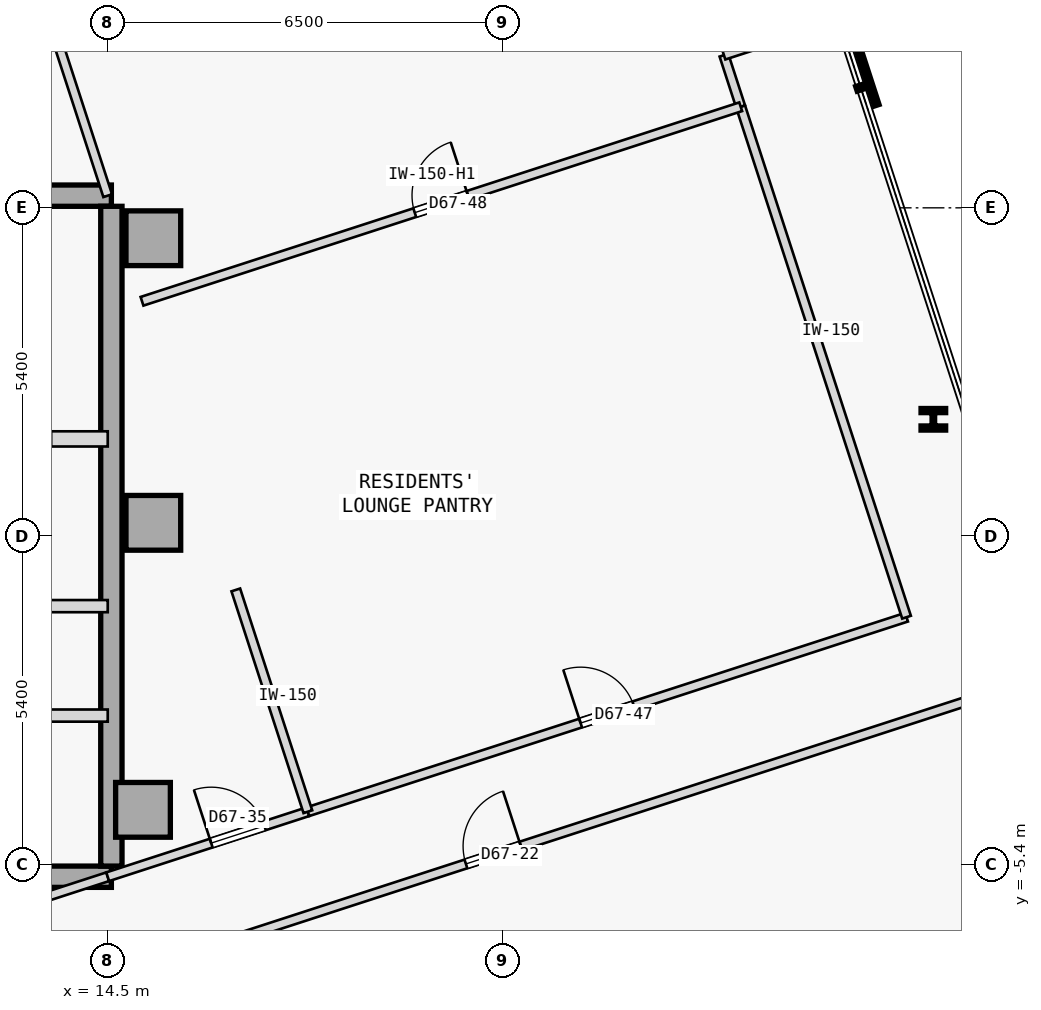
"""IFC4 building model, lengths in metres.
Left out: names, types, materials, properties, quantities, classifications, styles, units other than length and angle.
Written with IfcOpenShell. Run it as: python <this file> out.ifc"""

import sys

from ifc_helpers import new_model, si_unit, direction, frame, frame_2d, origin, origin_2d, place, context, subcontext, project, spatial, rectangle, i_section, extrude, element, fill, save


model = new_model("IFC4")
c1 = context("Model", 3, precision=1e-05, world=origin(), true_north=direction((0.0, 1.0)))
c2 = subcontext(c1, "Body", "Model", "MODEL_VIEW")
j1 = project(units=[si_unit("LENGTHUNIT", "METRE"), si_unit("PLANEANGLEUNIT", "RADIAN")], contexts=[c1])
p1 = place(None, origin())
s1 = spatial("IfcSite", under=j1, at=p1, CompositionType="ELEMENT")
p2 = place(p1, origin())
s2 = spatial("IfcBuilding", under=s1, at=p2, CompositionType="ELEMENT")
p3 = place(p2, frame((0.0, 0.0, 251.1)))
s3 = spatial("IfcBuildingStorey", under=s2, at=p3, CompositionType="ELEMENT", Elevation=251.1)
for number, where, z_axis, x_axis in (
    (1, (15.25, 4.9, 0.0), (0.0, 0.0, 1.0), (1.0, 0.0, 0.0)),
    (2, (15.25, 0.22, 0.0), (0.0, 0.0, 1.0), (1.0, 0.0, 0.0)),
    (3, (15.08, -4.5, 0.0), (0.0, 0.0, 1.0), (1.0, 0.0, 0.0)),
):
    element("IfcColumn", number, at=place(p3, frame(where, z_axis=z_axis, x_axis=x_axis)), inside=s3, PredefinedType="COLUMN", context=c2, shape_type="SweptSolid", body=[
        extrude(rectangle(XDim=0.9, YDim=0.9, at=origin_2d()), origin(), (0.0, 0.0, 1.0), 3.35),
    ])
p4 = place(p3, frame((3.15, 5.6, 0.0), z_axis=(0.0, 0.0, 1.0), x_axis=(1.0, 0.0, 0.0)))
e4 = element("IfcWall", 4, at=p4, inside=s3, PredefinedType="SHEAR", context=c2, shape_type="SweptSolid", body=[
    extrude(rectangle(XDim=11.41, YDim=0.35, at=frame_2d((5.705, 0.0))), origin(), (0.0, 0.0, 1.0), 2.95),
])
p5 = place(p3, frame((3.7, -5.6, 0.0), z_axis=(0.0, 0.0, 1.0), x_axis=(1.0, 0.0, 0.0)))
e5 = element("IfcWall", 5, at=p5, inside=s3, PredefinedType="SHEAR", context=c2, shape_type="SweptSolid", body=[
    extrude(rectangle(XDim=10.86, YDim=0.35, at=frame_2d((5.43, 0.0))), origin(), (0.0, 0.0, 1.0), 2.95),
])
p6 = place(p3, frame((14.56, -5.425, 0.0), z_axis=(0.0, 0.0, 1.0), x_axis=(0.0, 1.0, 0.0)))
e6 = element("IfcWall", 6, at=p6, inside=s3, PredefinedType="SHEAR", context=c2, shape_type="SweptSolid", body=[
    extrude(rectangle(XDim=10.85, YDim=0.35, at=frame_2d((5.425, 0.0))), origin(), (0.0, 0.0, 1.0), 2.95),
])
p7 = place(p3, frame((28.078, 1.922, 0.0), z_axis=(0.0, 0.0, 1.0), x_axis=(1.0, 0.0, 0.0)))
e7 = element("IfcColumn", 7, at=p7, inside=s3, PredefinedType="COLUMN", context=c2, shape_type="SweptSolid", body=[
    extrude(i_section(OverallWidth=0.405, OverallDepth=0.355, WebThickness=0.042, FlangeThickness=0.068, FilletRadius=0.015, at=origin_2d()), origin(), (0.0, 0.0, 1.0), 3.35),
])
p8 = place(p3, frame((10.9, 1.6, 0.0), z_axis=(0.0, 0.0, 1.0), x_axis=(1.0, 0.0, 0.0)))
e8 = element("IfcWall", 8, at=p8, inside=s3, PredefinedType="STANDARD", context=c2, shape_type="SweptSolid", body=[
    extrude(rectangle(XDim=3.6, YDim=0.25, at=frame_2d((1.8, 0.0))), origin(), (0.0, 0.0, 1.0), 2.95),
])
p9 = place(p8, frame((1.62, 0.0, 0.0)))
e9 = element("IfcOpeningElement", 9, at=p9, cuts=e8, PredefinedType="OPENING", context=c2, shape_type="SweptSolid", body=[
    extrude(rectangle(XDim=1.05, YDim=2.15, at=frame_2d((0.525, 1.075))), frame((0.0, 0.135, 0.0), z_axis=(0.0, -1.0, 0.0), x_axis=(1.0, 0.0, 0.0)), (0.0, 0.0, 1.0), 0.27),
])
p10 = place(p3, frame((11.55, -1.15, 0.0), z_axis=(0.0, 0.0, 1.0), x_axis=(1.0, 0.0, 0.0)))
e10 = element("IfcWall", 10, at=p10, inside=s3, PredefinedType="STANDARD", context=c2, shape_type="SweptSolid", body=[
    extrude(rectangle(XDim=2.95, YDim=0.2, at=frame_2d((1.475, 0.0))), origin(), (0.0, 0.0, 1.0), 2.95),
])
p11 = place(p10, frame((0.75, 0.0, 0.0)))
e11 = element("IfcOpeningElement", 11, at=p11, cuts=e10, PredefinedType="OPENING", context=c2, shape_type="SweptSolid", body=[
    extrude(rectangle(XDim=1.05, YDim=2.18, at=frame_2d((0.525, 1.09))), frame((0.0, 0.11, 0.0), z_axis=(0.0, -1.0, 0.0), x_axis=(1.0, 0.0, 0.0)), (0.0, 0.0, 1.0), 0.22),
])
p12 = place(p3, frame((3.7, -2.95, 0.0), z_axis=(0.0, 0.0, 1.0), x_axis=(1.0, 0.0, 0.0)))
e12 = element("IfcWall", 12, at=p12, inside=s3, PredefinedType="STANDARD", context=c2, shape_type="SweptSolid", body=[
    extrude(rectangle(XDim=10.8, YDim=0.2, at=frame_2d((5.4, 0.0))), origin(), (0.0, 0.0, 1.0), 2.95),
])
p13 = place(p12, frame((0.53, 0.0, 0.0)))
e13 = element("IfcOpeningElement", 13, at=p13, cuts=e12, PredefinedType="OPENING", context=c2, shape_type="SweptSolid", body=[
    extrude(rectangle(XDim=1.1, YDim=2.15, at=frame_2d((0.55, 1.075))), frame((0.0, 0.11, 0.0), z_axis=(0.0, -1.0, 0.0), x_axis=(1.0, 0.0, 0.0)), (0.0, 0.0, 1.0), 0.22),
])
p14 = place(p12, frame((4.14, 0.0, 0.0)))
e14 = element("IfcOpeningElement", 14, at=p14, cuts=e12, PredefinedType="OPENING", context=c2, shape_type="SweptSolid", body=[
    extrude(rectangle(XDim=0.92, YDim=2.15, at=frame_2d((0.46, 1.075))), frame((0.0, 0.11, 0.0), z_axis=(0.0, -1.0, 0.0), x_axis=(1.0, 0.0, 0.0)), (0.0, 0.0, 1.0), 0.22),
])
p15 = place(p12, frame((8.46, 0.0, 0.0)))
e15 = element("IfcOpeningElement", 15, at=p15, cuts=e12, PredefinedType="OPENING", context=c2, shape_type="SweptSolid", body=[
    extrude(rectangle(XDim=0.92, YDim=2.15, at=frame_2d((0.46, 1.075))), frame((0.0, 0.11, 0.0), z_axis=(0.0, -1.0, 0.0), x_axis=(1.0, 0.0, 0.0)), (0.0, 0.0, 1.0), 0.22),
])
p16 = place(p3, frame((11.669, -8.223, 0.0), z_axis=(0.0, 0.0, 1.0), x_axis=(0.951057967787, 0.309012527106, 0.0)))
e16 = element("IfcWall", 16, at=p16, inside=s3, PredefinedType="PARTITIONING", context=c2, shape_type="SweptSolid", body=[
    extrude(rectangle(XDim=19.291, YDim=0.15, at=frame_2d((9.646, 0.0))), origin(), (0.0, 0.0, 1.0), 2.95),
])
p17 = place(p16, frame((9.17, 0.0, 0.0)))
e17 = element("IfcOpeningElement", 17, at=p17, cuts=e16, PredefinedType="OPENING", context=c2, shape_type="SweptSolid", body=[
    extrude(rectangle(XDim=0.95, YDim=2.15, at=frame_2d((0.475, 1.075))), frame((0.0, 0.085, 0.0), z_axis=(0.0, -1.0, 0.0), x_axis=(1.0, 0.0, 0.0)), (0.0, 0.0, 1.0), 0.17),
])
p18 = place(p3, frame((7.588, -7.846, 0.0), z_axis=(0.0, 0.0, 1.0), x_axis=(0.951058013903, 0.309012385174, 0.0)))
e18 = element("IfcWall", 18, at=p18, inside=s3, PredefinedType="PARTITIONING", context=c2, shape_type="SweptSolid", body=[
    extrude(rectangle(XDim=7.267, YDim=0.15, at=frame_2d((3.634, 0.0))), origin(), (0.0, 0.0, 1.0), 2.95),
])
p19 = place(p18, frame((0.557, 0.0, 0.0)))
e19 = element("IfcOpeningElement", 19, at=p19, cuts=e18, PredefinedType="OPENING", context=c2, shape_type="SweptSolid", body=[
    extrude(rectangle(XDim=0.92, YDim=2.15, at=frame_2d((0.46, 1.075))), frame((0.0, 0.085, 0.0), z_axis=(0.0, -1.0, 0.0), x_axis=(1.0, 0.0, 0.0)), (0.0, 0.0, 1.0), 0.17),
])
p20 = place(p3, frame((14.5, -5.6, 0.0), z_axis=(0.0, 0.0, 1.0), x_axis=(0.951047546178, 0.309044600193, 0.0)))
e20 = element("IfcWall", 20, at=p20, inside=s3, PredefinedType="PARTITIONING", context=c2, shape_type="SweptSolid", body=[
    extrude(rectangle(XDim=3.461, YDim=0.15, at=frame_2d((1.73, 0.0))), origin(), (0.0, 0.0, 1.0), 2.95),
])
p21 = place(p20, frame((1.79, 0.0, 0.0)))
e21 = element("IfcOpeningElement", 21, at=p21, cuts=e20, PredefinedType="OPENING", context=c2, shape_type="SweptSolid", body=[
    extrude(rectangle(XDim=0.92, YDim=2.15, at=frame_2d((0.46, 1.075))), frame((0.0, 0.085, 0.0), z_axis=(0.0, -1.0, 0.0), x_axis=(1.0, 0.0, 0.0)), (0.0, 0.0, 1.0), 0.17),
])
p22 = place(p3, frame((17.791, -4.531, 0.0), z_axis=(0.0, 0.0, 1.0), x_axis=(0.951056769902, 0.309016213852, 0.0)))
e22 = element("IfcWall", 22, at=p22, inside=s3, PredefinedType="PARTITIONING", context=c2, shape_type="SweptSolid", body=[
    extrude(rectangle(XDim=10.352, YDim=0.15, at=frame_2d((5.176, 0.0))), origin(), (0.0, 0.0, 1.0), 2.95),
])
p23 = place(p22, frame((4.716, 0.0, 0.0)))
e23 = element("IfcOpeningElement", 23, at=p23, cuts=e22, PredefinedType="OPENING", context=c2, shape_type="SweptSolid", body=[
    extrude(rectangle(XDim=0.92, YDim=2.15, at=frame_2d((0.46, 1.075))), frame((0.0, 0.085, 0.0), z_axis=(0.0, -1.0, 0.0), x_axis=(1.0, 0.0, 0.0)), (0.0, 0.0, 1.0), 0.17),
])
p24 = place(p3, frame((27.637, -1.332, 0.0), z_axis=(0.0, 0.0, 1.0), x_axis=(-0.309040411618, 0.951048907253, 0.0)))
e24 = element("IfcWall", 24, at=p24, inside=s3, PredefinedType="PARTITIONING", context=c2, shape_type="SweptSolid", body=[
    extrude(rectangle(XDim=8.826, YDim=0.15, at=frame_2d((4.413, 0.0))), origin(), (0.0, 0.0, 1.0), 2.95),
])
p25 = place(p3, frame((24.909, 7.062, 0.0), z_axis=(0.0, 0.0, 1.0), x_axis=(-0.30899324298, 0.951064233263, 0.0)))
e25 = element("IfcWall", 25, at=p25, inside=s3, PredefinedType="PARTITIONING", context=c2, shape_type="SweptSolid", body=[
    extrude(rectangle(XDim=0.892, YDim=0.15, at=frame_2d((0.446, 0.0))), origin(), (0.0, 0.0, 1.0), 2.95),
])
p26 = place(p3, frame((24.634, 7.91, 0.0), z_axis=(0.0, 0.0, 1.0), x_axis=(0.951054051148, 0.309024581215, 0.0)))
e26 = element("IfcWall", 26, at=p26, inside=s3, PredefinedType="PARTITIONING", context=c2, shape_type="SweptSolid", body=[
    extrude(rectangle(XDim=1.975, YDim=0.15, at=frame_2d((0.988, 0.0))), origin(), (0.0, 0.0, 1.0), 2.95),
])
p27 = place(p3, frame((17.791, -4.531, 0.0), z_axis=(0.0, 0.0, 1.0), x_axis=(-0.309018414265, 0.951056054944, 0.0)))
e27 = element("IfcWall", 27, at=p27, inside=s3, PredefinedType="PARTITIONING", context=c2, shape_type="SweptSolid", body=[
    extrude(rectangle(XDim=3.835, YDim=0.15, at=frame_2d((1.917, 0.0))), origin(), (0.0, 0.0, 1.0), 2.95),
])
p28 = place(p3, frame((14.5, 5.6, 0.0), z_axis=(0.0, 0.0, 1.0), x_axis=(-0.308974360462, 0.951070367837, 0.0)))
e28 = element("IfcWall", 28, at=p28, inside=s3, PredefinedType="PARTITIONING", context=c2, shape_type="SweptSolid", body=[
    extrude(rectangle(XDim=4.843, YDim=0.15, at=frame_2d((2.421, 0.0))), origin(), (0.0, 0.0, 1.0), 2.95),
])
p29 = place(p3, frame((15.064, 3.863, 0.0), z_axis=(0.0, 0.0, 1.0), x_axis=(0.951061448945, 0.309001812827, 0.0)))
e29 = element("IfcWall", 29, at=p29, inside=s3, PredefinedType="PARTITIONING", context=c2, shape_type="SweptSolid", body=[
    extrude(rectangle(XDim=10.352, YDim=0.15, at=frame_2d((5.176, 0.0))), origin(), (0.0, 0.0, 1.0), 2.5),
])
p30 = place(p29, frame((4.716, 0.0, 0.0)))
e30 = element("IfcOpeningElement", 30, at=p30, cuts=e29, PredefinedType="OPENING", context=c2, shape_type="SweptSolid", body=[
    extrude(rectangle(XDim=0.92, YDim=2.15, at=frame_2d((0.46, 1.075))), frame((0.0, 0.085, 0.0), z_axis=(0.0, -1.0, 0.0), x_axis=(1.0, 0.0, 0.0)), (0.0, 0.0, 1.0), 0.17),
])
p31 = place(p17, origin())
e31 = element("IfcDoor", 31, at=p31, inside=s3, OperationType="SINGLE_SWING_RIGHT", PredefinedType="DOOR", context=c2, shape_type="SweptSolid", body=[
    extrude(rectangle(XDim=0.95, YDim=2.15, at=frame_2d((0.475, 1.075))), frame((0.0, 0.025, 0.0), z_axis=(0.0, -1.0, 0.0), x_axis=(1.0, 0.0, 0.0)), (0.0, 0.0, 1.0), 0.05),
])
fill(e17, e31)
p32 = place(p21, origin())
e32 = element("IfcDoor", 32, at=p32, inside=s3, OperationType="SINGLE_SWING_LEFT", PredefinedType="DOOR", context=c2, shape_type="SweptSolid", body=[
    extrude(rectangle(XDim=0.92, YDim=2.15, at=frame_2d((0.46, 1.075))), frame((0.0, 0.025, 0.0), z_axis=(0.0, -1.0, 0.0), x_axis=(1.0, 0.0, 0.0)), (0.0, 0.0, 1.0), 0.05),
])
fill(e21, e32)
p33 = place(p23, origin())
e33 = element("IfcDoor", 33, at=p33, inside=s3, OperationType="SINGLE_SWING_LEFT", PredefinedType="DOOR", context=c2, shape_type="SweptSolid", body=[
    extrude(rectangle(XDim=0.92, YDim=2.15, at=frame_2d((0.46, 1.075))), frame((0.0, 0.025, 0.0), z_axis=(0.0, -1.0, 0.0), x_axis=(1.0, 0.0, 0.0)), (0.0, 0.0, 1.0), 0.05),
])
fill(e23, e33)
p34 = place(p30, origin())
e34 = element("IfcDoor", 34, at=p34, inside=s3, OperationType="SINGLE_SWING_RIGHT", PredefinedType="DOOR", context=c2, shape_type="SweptSolid", body=[
    extrude(rectangle(XDim=0.92, YDim=2.15, at=frame_2d((0.46, 1.075))), frame((0.0, 0.025, 0.0), z_axis=(0.0, -1.0, 0.0), x_axis=(1.0, 0.0, 0.0)), (0.0, 0.0, 1.0), 0.05),
])
fill(e30, e34)
save(model, sys.argv[1])
